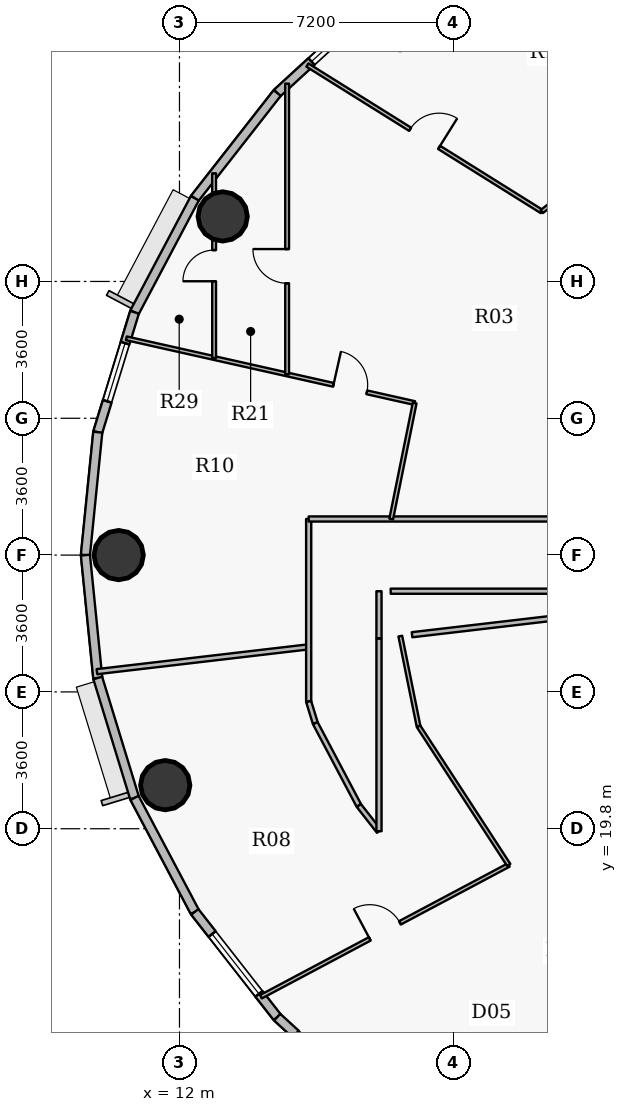
"""IFC4 building model, lengths in metres.
Left out: names, types, materials, properties, quantities, classifications, styles, units other than length and angle.
Written with IfcOpenShell. Run it as: python <this file> out.ifc"""

import sys

from ifc_helpers import new_model, si_unit, direction, frame, frame_2d, origin, origin_2d, place, context, subcontext, project, spatial, rectangle, hollow_circle, extrude, source, transform, mapped, element, fill, save


model = new_model("IFC4")
c1 = context("Model", 3, precision=1e-05, world=origin(), true_north=direction((0.0, 1.0)))
c2 = subcontext(c1, "Body", "Model", "MODEL_VIEW")
j1 = project(units=[si_unit("LENGTHUNIT", "METRE"), si_unit("PLANEANGLEUNIT", "RADIAN")], contexts=[c1])
p1 = place(None, origin())
s1 = spatial("IfcSite", under=j1, at=p1, CompositionType="ELEMENT")
p2 = place(p1, origin())
s2 = spatial("IfcBuilding", under=s1, at=p2, CompositionType="ELEMENT")
p3 = place(p2, frame((0.0, 0.0, 178.65)))
s3 = spatial("IfcBuildingStorey", under=s2, at=p3, CompositionType="ELEMENT", Elevation=178.65)
for number, where, z_axis, x_axis in (
    (1, (13.137, 35.911, 0.0), (0.0, 0.0, 1.0), (1.0, 0.0, 0.0)),
    (2, (10.4, 27.0, 0.0), (0.0, 0.0, 1.0), (1.0, 0.0, 0.0)),
    (3, (11.625, 20.947, 0.0), (0.0, 0.0, 1.0), (1.0, 0.0, 0.0)),
):
    element("IfcColumn", number, at=place(p3, frame(where, z_axis=z_axis, x_axis=x_axis)), inside=s3, PredefinedType="COLUMN", context=c2, shape_type="SweptSolid", body=[
        extrude(hollow_circle(Radius=0.65, WallThickness=0.04, at=origin_2d()), origin(), (0.0, 0.0, 1.0), 3.75),
    ])
p4 = place(p3, frame((14.572, 39.158, 0.0), z_axis=(0.0, 0.0, 1.0), x_axis=(0.737076565834, 0.675809245349, 0.0)))
e4 = element("IfcWall", 4, at=p4, inside=s3, PredefinedType="SOLIDWALL", context=c2, shape_type="SweptSolid", body=[
    extrude(rectangle(XDim=3.658, YDim=0.24, at=frame_2d((1.829, 0.0))), origin(), (0.0, 0.0, 1.0), 3.5),
])
p5 = place(p4, frame((1.224, 0.0, 0.9)))
e5 = element("IfcOpeningElement", 5, at=p5, cuts=e4, PredefinedType="OPENING", context=c2, shape_type="SweptSolid", body=[
    extrude(rectangle(XDim=1.25, YDim=1.65, at=origin_2d()), frame((0.625, 0.13, 0.825), z_axis=(0.0, -1.0, 0.0), x_axis=(1.0, 0.0, 0.0)), (0.0, 0.0, 1.0), 0.26),
])
p6 = place(p3, frame((12.404, 36.388, 0.0), z_axis=(0.0, 0.0, 1.0), x_axis=(0.616287674549, 0.787521112224, 0.0)))
e6 = element("IfcWall", 6, at=p6, inside=s3, PredefinedType="SOLIDWALL", context=c2, shape_type="SweptSolid", body=[
    extrude(rectangle(XDim=3.517, YDim=0.24, at=frame_2d((1.759, 0.0))), origin(), (0.0, 0.0, 1.0), 3.5),
])
p7 = place(p3, frame((10.817, 33.389, 0.0), z_axis=(0.0, 0.0, 1.0), x_axis=(0.467586874938, 0.88394712194, 0.0)))
e7 = element("IfcWall", 7, at=p7, inside=s3, PredefinedType="SOLIDWALL", context=c2, shape_type="SweptSolid", body=[
    extrude(rectangle(XDim=3.393, YDim=0.24, at=frame_2d((1.697, 0.0))), origin(), (0.0, 0.0, 1.0), 3.5),
])
p8 = place(p3, frame((9.85, 30.234, 0.0), z_axis=(0.0, 0.0, 1.0), x_axis=(0.293097995113, 0.956082405058, 0.0)))
e8 = element("IfcWall", 8, at=p8, inside=s3, PredefinedType="SOLIDWALL", context=c2, shape_type="SweptSolid", body=[
    extrude(rectangle(XDim=3.3, YDim=0.24, at=frame_2d((1.65, 0.0))), origin(), (0.0, 0.0, 1.0), 3.5),
])
p9 = place(p8, frame((0.85, 0.0, 0.9)))
e9 = element("IfcOpeningElement", 9, at=p9, cuts=e8, PredefinedType="OPENING", context=c2, shape_type="SweptSolid", body=[
    extrude(rectangle(XDim=1.6, YDim=1.75, at=origin_2d()), frame((0.8, 0.13, 0.875), z_axis=(0.0, -1.0, 0.0), x_axis=(1.0, 0.0, 0.0)), (0.0, 0.0, 1.0), 0.26),
])
for number, where, z_axis, x_axis in (
    (10, (9.525, 27.0, 0.0), (0.0, 0.0, 1.0), (0.1, 0.995, 0.0)),
    (11, (9.85, 23.766, 0.0), (0.0, 0.0, 1.0), (-0.1, 0.995, 0.0)),
):
    element("IfcWall", number, at=place(p3, frame(where, z_axis=z_axis, x_axis=x_axis)), inside=s3, PredefinedType="SOLIDWALL", context=c2, shape_type="SweptSolid", body=[
        extrude(rectangle(XDim=3.25, YDim=0.24, at=frame_2d((1.625, 0.0))), origin(), (0.0, 0.0, 1.0), 3.5),
    ])
p10 = place(p3, frame((10.817, 20.611, 0.0), z_axis=(0.0, 0.0, 1.0), x_axis=(-0.293097995113, 0.956082405058, 0.0)))
e12 = element("IfcWall", 12, at=p10, inside=s3, PredefinedType="SOLIDWALL", context=c2, shape_type="SweptSolid", body=[
    extrude(rectangle(XDim=3.3, YDim=0.24, at=frame_2d((1.65, 0.0))), origin(), (0.0, 0.0, 1.0), 3.5),
])
p11 = place(p3, frame((12.404, 17.612, 0.0), z_axis=(0.0, 0.0, 1.0), x_axis=(-0.467586874938, 0.88394712194, 0.0)))
e13 = element("IfcWall", 13, at=p11, inside=s3, PredefinedType="SOLIDWALL", context=c2, shape_type="SweptSolid", body=[
    extrude(rectangle(XDim=3.393, YDim=0.24, at=frame_2d((1.697, 0.0))), origin(), (0.0, 0.0, 1.0), 3.5),
])
p12 = place(p3, frame((14.572, 14.842, 0.0), z_axis=(0.0, 0.0, 1.0), x_axis=(-0.616287674549, 0.787521112224, 0.0)))
e14 = element("IfcWall", 14, at=p12, inside=s3, PredefinedType="SOLIDWALL", context=c2, shape_type="SweptSolid", body=[
    extrude(rectangle(XDim=3.517, YDim=0.24, at=frame_2d((1.759, 0.0))), origin(), (0.0, 0.0, 1.0), 3.5),
])
p13 = place(p12, frame((0.779, 0.0, 0.9)))
e15 = element("IfcOpeningElement", 15, at=p13, cuts=e14, PredefinedType="OPENING", context=c2, shape_type="SweptSolid", body=[
    extrude(rectangle(XDim=2.0, YDim=1.75, at=origin_2d()), frame((1.0, 0.13, 0.875), z_axis=(0.0, -1.0, 0.0), x_axis=(1.0, 0.0, 0.0)), (0.0, 0.0, 1.0), 0.26),
])
p14 = place(p3, frame((17.268, 12.369, 0.0), z_axis=(0.0, 0.0, 1.0), x_axis=(-0.737076565834, 0.675809245349, 0.0)))
e16 = element("IfcWall", 16, at=p14, inside=s3, PredefinedType="SOLIDWALL", context=c2, shape_type="SweptSolid", body=[
    extrude(rectangle(XDim=3.658, YDim=0.24, at=frame_2d((1.829, 0.0))), origin(), (0.0, 0.0, 1.0), 3.5),
])
p15 = place(p14, frame((1.746, 0.0, 0.9)))
e17 = element("IfcOpeningElement", 17, at=p15, cuts=e16, PredefinedType="OPENING", context=c2, shape_type="SweptSolid", body=[
    extrude(rectangle(XDim=1.25, YDim=1.65, at=origin_2d()), frame((0.625, 0.13, 0.825), z_axis=(0.0, -1.0, 0.0), x_axis=(1.0, 0.0, 0.0)), (0.0, 0.0, 1.0), 0.26),
])
p16 = place(p3, frame((9.828, 23.933, 0.0), z_axis=(0.0, 0.0, 1.0), x_axis=(0.993205157511, 0.116376608877, 0.0)))
e18 = element("IfcWall", 18, at=p16, inside=s3, PredefinedType="PARTITIONING", context=c2, shape_type="SweptSolid", body=[
    extrude(rectangle(XDim=5.61, YDim=0.135, at=frame_2d((2.805, 0.0))), origin(), (0.0, 0.0, 1.0), 2.935),
])
p17 = place(p3, frame((10.602, 32.704, 0.0), z_axis=(0.0, 0.0, 1.0), x_axis=(0.9756977614, -0.21912069368, 0.0)))
e19 = element("IfcWall", 19, at=p17, inside=s3, PredefinedType="PARTITIONING", context=c2, shape_type="SweptSolid", body=[
    extrude(rectangle(XDim=7.776, YDim=0.1, at=frame_2d((3.888, 0.0))), origin(), (0.0, 0.0, 1.0), 2.935),
])
p18 = place(p17, frame((5.586, 0.0, 0.0)))
e20 = element("IfcOpeningElement", 20, at=p18, cuts=e19, PredefinedType="OPENING", context=c2, shape_type="SweptSolid", body=[
    extrude(rectangle(XDim=0.9, YDim=2.1, at=origin_2d()), frame((0.45, 0.06, 1.05), z_axis=(0.0, -1.0, 0.0), x_axis=(1.0, 0.0, 0.0)), (0.0, 0.0, 1.0), 0.12),
])
p19 = place(p3, frame((12.912, 32.185, 0.0), z_axis=(0.0, 0.0, 1.0), x_axis=(0.0, 1.0, 0.0)))
e21 = element("IfcWall", 21, at=p19, inside=s3, PredefinedType="PARTITIONING", context=c2, shape_type="SweptSolid", body=[
    extrude(rectangle(XDim=4.86, YDim=0.1, at=frame_2d((2.43, 0.0))), origin(), (0.0, 0.0, 1.0), 2.935),
])
p20 = place(p19, frame((2.02, 0.0, 0.0)))
e22 = element("IfcOpeningElement", 22, at=p20, cuts=e21, PredefinedType="OPENING", context=c2, shape_type="SweptSolid", body=[
    extrude(rectangle(XDim=0.82, YDim=2.1, at=origin_2d()), frame((0.41, 0.06, 1.05), z_axis=(0.0, -1.0, 0.0), x_axis=(1.0, 0.0, 0.0)), (0.0, 0.0, 1.0), 0.12),
])
p21 = place(p3, frame((14.145, 15.379, 0.0), z_axis=(0.0, 0.0, 1.0), x_axis=(0.882946160832, 0.469474256027, 0.0)))
e23 = element("IfcWall", 23, at=p21, inside=s3, PredefinedType="PARTITIONING", context=c2, shape_type="SweptSolid", body=[
    extrude(rectangle(XDim=7.385, YDim=0.1, at=frame_2d((3.692, 0.0))), origin(), (0.0, 0.0, 1.0), 2.935),
])
p22 = place(p21, frame((3.242, 0.0, 0.0)))
e24 = element("IfcOpeningElement", 24, at=p22, cuts=e23, PredefinedType="OPENING", context=c2, shape_type="SweptSolid", body=[
    extrude(rectangle(XDim=0.9, YDim=2.1, at=origin_2d()), frame((0.45, 0.06, 1.05), z_axis=(0.0, -1.0, 0.0), x_axis=(1.0, 0.0, 0.0)), (0.0, 0.0, 1.0), 0.12),
])
p23 = place(p3, frame((14.833, 31.754, 0.0), z_axis=(0.0, 0.0, 1.0), x_axis=(0.0, 1.0, 0.0)))
e25 = element("IfcWall", 25, at=p23, inside=s3, PredefinedType="PARTITIONING", context=c2, shape_type="SweptSolid", body=[
    extrude(rectangle(XDim=7.651, YDim=0.1, at=frame_2d((3.825, 0.0))), origin(), (0.0, 0.0, 1.0), 2.935),
])
p24 = place(p23, frame((2.399, 0.0, 0.0)))
e26 = element("IfcOpeningElement", 26, at=p24, cuts=e25, PredefinedType="OPENING", context=c2, shape_type="SweptSolid", body=[
    extrude(rectangle(XDim=0.9, YDim=2.1, at=origin_2d()), frame((0.45, 0.06, 1.05), z_axis=(0.0, -1.0, 0.0), x_axis=(1.0, 0.0, 0.0)), (0.0, 0.0, 1.0), 0.12),
])
p25 = place(p3, frame((15.366, 39.894, 0.0), z_axis=(0.0, 0.0, 1.0), x_axis=(0.84804732756, -0.529920494242, 0.0)))
e27 = element("IfcWall", 27, at=p25, inside=s3, PredefinedType="PARTITIONING", context=c2, shape_type="SweptSolid", body=[
    extrude(rectangle(XDim=7.274, YDim=0.1, at=frame_2d((3.637, 0.0))), origin(), (0.0, 0.0, 1.0), 2.935),
])
p26 = place(p25, frame((3.187, 0.0, 0.0)))
e28 = element("IfcOpeningElement", 28, at=p26, cuts=e27, PredefinedType="OPENING", context=c2, shape_type="SweptSolid", body=[
    extrude(rectangle(XDim=0.9, YDim=2.1, at=origin_2d()), frame((0.45, 0.06, 1.05), z_axis=(0.0, -1.0, 0.0), x_axis=(1.0, 0.0, 0.0)), (0.0, 0.0, 1.0), 0.12),
])
p27 = place(p3, frame((15.4, 23.146, 0.0), z_axis=(0.0, 0.0, 1.0), x_axis=(0.0, 1.0, 0.0)))
e29 = element("IfcWall", 29, at=p27, inside=s3, PredefinedType="PARTITIONING", context=c2, shape_type="SweptSolid", body=[
    extrude(rectangle(XDim=4.804, YDim=0.135, at=frame_2d((2.402, 0.0))), origin(), (0.0, 0.0, 1.0), 2.935),
])
p28 = place(p3, frame((15.4, 23.146, 0.0), z_axis=(0.0, 0.0, 1.0), x_axis=(0.293335154151, -0.956009669061, 0.0)))
e30 = element("IfcWall", 30, at=p28, inside=s3, PredefinedType="PARTITIONING", context=c2, shape_type="SweptSolid", body=[
    extrude(rectangle(XDim=0.594, YDim=0.135, at=frame_2d((0.297, 0.0))), origin(), (0.0, 0.0, 1.0), 3.5),
])
p29 = place(p3, frame((15.4, 27.95, 0.0), z_axis=(0.0, 0.0, 1.0), x_axis=(1.0, 0.0, 0.0)))
e31 = element("IfcWall", 31, at=p29, inside=s3, PredefinedType="PARTITIONING", context=c2, shape_type="SweptSolid", body=[
    extrude(rectangle(XDim=8.95, YDim=0.135, at=frame_2d((4.475, 0.0))), origin(), (0.0, 0.0, 1.0), 3.5),
])
p30 = place(p3, frame((15.574, 22.578, 0.0), z_axis=(0.0, 0.0, 1.0), x_axis=(0.46757196543, -0.883955008552, 0.0)))
e32 = element("IfcWall", 32, at=p30, inside=s3, PredefinedType="PARTITIONING", context=c2, shape_type="SweptSolid", body=[
    extrude(rectangle(XDim=2.451, YDim=0.135, at=frame_2d((1.226, 0.0))), origin(), (0.0, 0.0, 1.0), 2.935),
])
p31 = place(p3, frame((16.72, 20.411, 0.0), z_axis=(0.0, 0.0, 1.0), x_axis=(0.616377221056, -0.787451027914, 0.0)))
e33 = element("IfcWall", 33, at=p31, inside=s3, PredefinedType="PARTITIONING", context=c2, shape_type="SweptSolid", body=[
    extrude(rectangle(XDim=0.859, YDim=0.135, at=frame_2d((0.43, 0.0))), origin(), (0.0, 0.0, 1.0), 3.5),
])
p32 = place(p3, frame((17.25, 19.734, 0.0), z_axis=(0.0, 0.0, 1.0), x_axis=(0.0, 1.0, 0.0)))
e34 = element("IfcWall", 34, at=p32, inside=s3, PredefinedType="PARTITIONING", context=c2, shape_type="SweptSolid", body=[
    extrude(rectangle(XDim=5.068, YDim=0.135, at=frame_2d((2.534, 0.0))), origin(), (0.0, 0.0, 1.0), 2.935),
])
p33 = place(p3, frame((17.572, 27.95, 0.0), z_axis=(0.0, 0.0, 1.0), x_axis=(0.19818274337, 0.980165088253, 0.0)))
e35 = element("IfcWall", 35, at=p33, inside=s3, PredefinedType="PARTITIONING", context=c2, shape_type="SweptSolid", body=[
    extrude(rectangle(XDim=3.112, YDim=0.1, at=frame_2d((1.556, 0.0))), origin(), (0.0, 0.0, 1.0), 3.5),
])
p34 = place(p3, frame((17.811, 24.868, 0.0), z_axis=(0.0, 0.0, 1.0), x_axis=(0.198247700743, -0.980151952072, 0.0)))
e36 = element("IfcWall", 36, at=p34, inside=s3, PredefinedType="PARTITIONING", context=c2, shape_type="SweptSolid", body=[
    extrude(rectangle(XDim=2.422, YDim=0.1, at=frame_2d((1.211, 0.0))), origin(), (0.0, 0.0, 1.0), 2.935),
])
p35 = place(p3, frame((18.291, 22.494, 0.0), z_axis=(0.0, 0.0, 1.0), x_axis=(0.545410225271, -0.838169246734, 0.0)))
e37 = element("IfcWall", 37, at=p35, inside=s3, PredefinedType="PARTITIONING", context=c2, shape_type="SweptSolid", body=[
    extrude(rectangle(XDim=4.352, YDim=0.1, at=frame_2d((2.176, 0.0))), origin(), (0.0, 0.0, 1.0), 2.935),
])
p36 = place(p3, frame((21.259, 9.852, 0.0), z_axis=(0.0, 0.0, 1.0), x_axis=(0.651889454341, 0.758314011026, 0.0)))
e38 = element("IfcWall", 38, at=p36, inside=s3, PredefinedType="PARTITIONING", context=c2, shape_type="SweptSolid", body=[
    extrude(rectangle(XDim=10.942, YDim=0.135, at=frame_2d((5.471, 0.0))), origin(), (0.0, 0.0, 1.0), 2.935),
])
p37 = place(p3, frame((21.534, 36.039, 0.0), z_axis=(0.0, 0.0, 1.0), x_axis=(0.787313734036, 0.616552580238, 0.0)))
e39 = element("IfcWall", 39, at=p37, inside=s3, PredefinedType="PARTITIONING", context=c2, shape_type="SweptSolid", body=[
    extrude(rectangle(XDim=4.472, YDim=0.1, at=frame_2d((2.236, 0.0))), origin(), (0.0, 0.0, 1.0), 2.935),
])
p38 = place(p3, frame((17.25, 26.05, 0.0), z_axis=(0.0, 0.0, 1.0), x_axis=(0.0, -1.0, 0.0)))
e40 = element("IfcWall", 40, at=p38, inside=s3, PredefinedType="PARTITIONING", context=c2, shape_type="SweptSolid", body=[
    extrude(rectangle(XDim=1.238, YDim=0.135, at=frame_2d((0.619, 0.0))), origin(), (0.0, 0.0, 1.0), 3.035),
])
p39 = place(p3, frame((24.042, 26.05, 0.0), z_axis=(0.0, 0.0, 1.0), x_axis=(-1.0, 0.0, 0.0)))
e41 = element("IfcWall", 41, at=p39, inside=s3, PredefinedType="PARTITIONING", context=c2, shape_type="SweptSolid", body=[
    extrude(rectangle(XDim=6.485, YDim=0.135, at=frame_2d((3.242, 0.0))), origin(), (0.0, 0.0, 1.0), 3.5),
])
p40 = place(p3, frame((18.12, 24.905, 0.0), z_axis=(0.0, 0.0, 1.0), x_axis=(0.993204061109, 0.116385965632, 0.0)))
e42 = element("IfcWall", 42, at=p40, inside=s3, PredefinedType="PARTITIONING", context=c2, shape_type="SweptSolid", body=[
    extrude(rectangle(XDim=5.943, YDim=0.135, at=frame_2d((2.971, 0.0))), origin(), (0.0, 0.0, 1.0), 3.5),
])
m1 = source(origin(), c2, "Body", "SweptSolid", [
    extrude(rectangle(XDim=1.6, YDim=1.75, at=origin_2d()), frame((0.8, 0.03, 0.875), z_axis=(0.0, -1.0, 0.0), x_axis=(1.0, 0.0, 0.0)), (0.0, 0.0, 1.0), 0.06),
])
p41 = place(p9, origin())
e43 = element("IfcWindow", 43, at=p41, inside=s3, PartitioningType="DOUBLE_PANEL_VERTICAL", PredefinedType="WINDOW", context=c2, shape_type="MappedRepresentation", body=[
    mapped(m1, transform((0.0, 0.0, 0.0), x_axis=(1.0, 0.0, 0.0), y_axis=(0.0, 1.0, 0.0), z_axis=(0.0, 0.0, 1.0), scale=1.0)),
])
fill(e9, e43)
m2 = source(origin(), c2, "Body", "SweptSolid", [
    extrude(rectangle(XDim=2.0, YDim=1.75, at=origin_2d()), frame((1.0, 0.03, 0.875), z_axis=(0.0, -1.0, 0.0), x_axis=(1.0, 0.0, 0.0)), (0.0, 0.0, 1.0), 0.06),
])
p42 = place(p13, origin())
e44 = element("IfcWindow", 44, at=p42, inside=s3, PartitioningType="DOUBLE_PANEL_VERTICAL", PredefinedType="WINDOW", context=c2, shape_type="MappedRepresentation", body=[
    mapped(m2, transform((0.0, 0.0, 0.0), x_axis=(1.0, 0.0, 0.0), y_axis=(0.0, 1.0, 0.0), z_axis=(0.0, 0.0, 1.0), scale=1.0)),
])
fill(e15, e44)
m3 = source(origin(), c2, "Body", "SweptSolid", [
    extrude(rectangle(XDim=1.25, YDim=1.65, at=origin_2d()), frame((0.625, 0.03, 0.825), z_axis=(0.0, -1.0, 0.0), x_axis=(1.0, 0.0, 0.0)), (0.0, 0.0, 1.0), 0.06),
])
p43 = place(p5, origin())
e45 = element("IfcWindow", 45, at=p43, inside=s3, PartitioningType="SINGLE_PANEL", PredefinedType="WINDOW", context=c2, shape_type="MappedRepresentation", body=[
    mapped(m3, transform((0.0, 0.0, 0.0), x_axis=(1.0, 0.0, 0.0), y_axis=(0.0, 1.0, 0.0), z_axis=(0.0, 0.0, 1.0), scale=1.0)),
])
fill(e5, e45)
m4 = source(origin(), c2, "Body", "SweptSolid", [
    extrude(rectangle(XDim=0.9, YDim=2.1, at=origin_2d()), frame((0.45, 0.025, 1.05), z_axis=(0.0, -1.0, 0.0), x_axis=(1.0, 0.0, 0.0)), (0.0, 0.0, 1.0), 0.05),
])
p44 = place(p26, origin())
e46 = element("IfcDoor", 46, at=p44, inside=s3, OperationType="SINGLE_SWING_RIGHT", PredefinedType="DOOR", context=c2, shape_type="MappedRepresentation", body=[
    mapped(m4, transform((0.0, 0.0, 0.0), x_axis=(1.0, 0.0, 0.0), y_axis=(0.0, 1.0, 0.0), z_axis=(0.0, 0.0, 1.0), scale=1.0)),
])
fill(e28, e46)
p45 = place(p18, origin())
e47 = element("IfcDoor", 47, at=p45, inside=s3, OperationType="SINGLE_SWING_LEFT", PredefinedType="DOOR", context=c2, shape_type="MappedRepresentation", body=[
    mapped(m4, transform((0.0, 0.0, 0.0), x_axis=(1.0, 0.0, 0.0), y_axis=(0.0, 1.0, 0.0), z_axis=(0.0, 0.0, 1.0), scale=1.0)),
])
fill(e20, e47)
p46 = place(p24, origin())
e48 = element("IfcDoor", 48, at=p46, inside=s3, OperationType="SINGLE_SWING_RIGHT", PredefinedType="DOOR", context=c2, shape_type="MappedRepresentation", body=[
    mapped(m4, transform((0.0, 0.0, 0.0), x_axis=(1.0, 0.0, 0.0), y_axis=(0.0, 1.0, 0.0), z_axis=(0.0, 0.0, 1.0), scale=1.0)),
])
fill(e26, e48)
m5 = source(origin(), c2, "Body", "SweptSolid", [
    extrude(rectangle(XDim=0.82, YDim=2.1, at=origin_2d()), frame((0.41, 0.025, 1.05), z_axis=(0.0, -1.0, 0.0), x_axis=(1.0, 0.0, 0.0)), (0.0, 0.0, 1.0), 0.05),
])
p47 = place(p20, origin())
e49 = element("IfcDoor", 49, at=p47, inside=s3, OperationType="SINGLE_SWING_LEFT", PredefinedType="DOOR", context=c2, shape_type="MappedRepresentation", body=[
    mapped(m5, transform((0.0, 0.0, 0.0), x_axis=(1.0, 0.0, 0.0), y_axis=(0.0, 1.0, 0.0), z_axis=(0.0, 0.0, 1.0), scale=1.0)),
])
fill(e22, e49)
p48 = place(p22, origin())
e50 = element("IfcDoor", 50, at=p48, inside=s3, OperationType="SINGLE_SWING_LEFT", PredefinedType="DOOR", context=c2, shape_type="MappedRepresentation", body=[
    mapped(m4, transform((0.0, 0.0, 0.0), x_axis=(1.0, 0.0, 0.0), y_axis=(0.0, 1.0, 0.0), z_axis=(0.0, 0.0, 1.0), scale=1.0)),
])
fill(e24, e50)
save(model, sys.argv[1])
